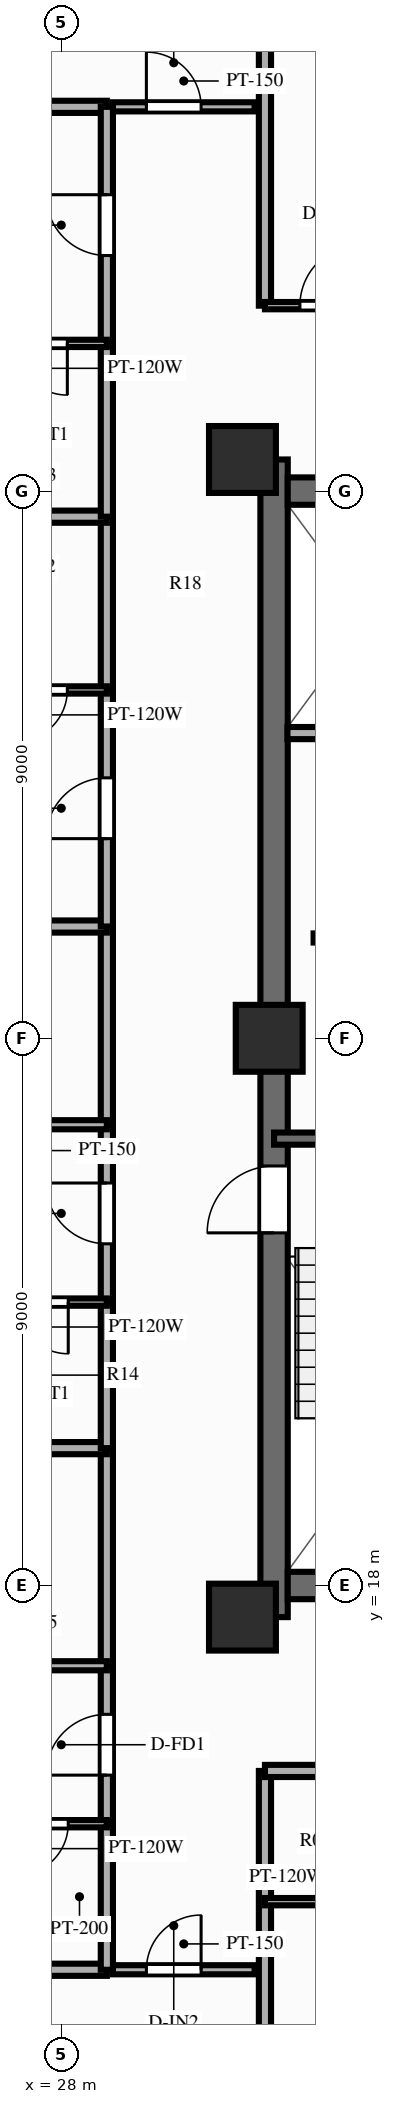
"""IFC4 building model, lengths in metres.
Left out: names, types, materials, properties, quantities, classifications, styles, units other than length and angle.
Written with IfcOpenShell. Run it as: python <this file> out.ifc"""

import sys

from ifc_helpers import new_model, si_unit, direction, frame, frame_2d, origin, origin_2d, place, context, subcontext, project, spatial, rectangle, extrude, source, transform, mapped, element, fill, save


model = new_model("IFC4")
c1 = context("Model", 3, precision=1e-05, world=origin(), true_north=direction((0.0, 1.0)))
c2 = subcontext(c1, "Body", "Model", "MODEL_VIEW")
j1 = project(units=[si_unit("LENGTHUNIT", "METRE"), si_unit("PLANEANGLEUNIT", "RADIAN")], contexts=[c1])
p1 = place(None, origin())
s1 = spatial("IfcSite", under=j1, at=p1, CompositionType="ELEMENT")
p2 = place(p1, origin())
s2 = spatial("IfcBuilding", under=s1, at=p2, CompositionType="ELEMENT")
p3 = place(p2, frame((0.0, 0.0, 202.6)))
s3 = spatial("IfcBuildingStorey", under=s2, at=p3, CompositionType="ELEMENT", Elevation=202.6)
p4 = place(p3, frame((31.5, 17.48, 0.0), z_axis=(0.0, 0.0, 1.0), x_axis=(0.0, 1.0, 0.0)))
e1 = element("IfcWall", 1, at=p4, inside=s3, PredefinedType="SHEAR", context=c2, shape_type="SweptSolid", body=[
    extrude(rectangle(XDim=19.04, YDim=0.45, at=frame_2d((9.52, 0.0))), origin(), (0.0, 0.0, 1.0), 3.9),
])
p5 = place(p4, frame((6.32, 0.0, 0.0)))
e2 = element("IfcOpeningElement", 2, at=p5, cuts=e1, PredefinedType="OPENING", context=c2, shape_type="SweptSolid", body=[
    extrude(rectangle(XDim=1.1, YDim=2.15, at=frame_2d((0.55, 1.075))), frame((0.0, 0.237, 0.0), z_axis=(0.0, -1.0, 0.0), x_axis=(1.0, 0.0, 0.0)), (0.0, 0.0, 1.0), 0.474),
])
p6 = place(p3, frame((31.725, 18.0, 0.0), z_axis=(0.0, 0.0, 1.0), x_axis=(1.0, 0.0, 0.0)))
e3 = element("IfcWall", 3, at=p6, inside=s3, PredefinedType="SHEAR", context=c2, shape_type="SweptSolid", body=[
    extrude(rectangle(XDim=12.55, YDim=0.45, at=frame_2d((6.275, 0.0))), origin(), (0.0, 0.0, 1.0), 3.9),
])
p7 = place(p3, frame((31.725, 36.0, 0.0), z_axis=(0.0, 0.0, 1.0), x_axis=(1.0, 0.0, 0.0)))
e4 = element("IfcWall", 4, at=p7, inside=s3, PredefinedType="SHEAR", context=c2, shape_type="SweptSolid", body=[
    extrude(rectangle(XDim=12.55, YDim=0.45, at=frame_2d((6.275, 0.0))), origin(), (0.0, 0.0, 1.0), 3.9),
])
p8 = place(p7, frame((5.225, 0.0, 0.0), z_axis=(0.0, 0.0, 1.0), x_axis=(-1.0, 0.0, 0.0)))
e5 = element("IfcOpeningElement", 5, at=p8, cuts=e4, PredefinedType="OPENING", context=c2, shape_type="SweptSolid", body=[
    extrude(rectangle(XDim=1.4, YDim=2.15, at=frame_2d((0.7, 1.075))), frame((0.0, 0.237, 0.0), z_axis=(0.0, -1.0, 0.0), x_axis=(1.0, 0.0, 0.0)), (0.0, 0.0, 1.0), 0.474),
])
m1 = source(origin(), c2, "Body", "SweptSolid", [
    extrude(rectangle(XDim=1.1, YDim=1.1, at=origin_2d()), origin(), (0.0, 0.0, 1.0), 3.9),
])
for number, where, z_axis, x_axis in (
    (6, (30.98, 17.48, 0.0), (0.0, 0.0, 1.0), (1.0, 0.0, 0.0)),
    (7, (30.98, 36.52, 0.0), (0.0, 0.0, 1.0), (1.0, 0.0, 0.0)),
    (8, (31.42, 27.0, 0.0), (0.0, 0.0, 1.0), (1.0, 0.0, 0.0)),
):
    element("IfcColumn", number, at=place(p3, frame(where, z_axis=z_axis, x_axis=x_axis)), inside=s3, PredefinedType="COLUMN", context=c2, shape_type="MappedRepresentation", body=[
        mapped(m1, transform((0.0, 0.0, 0.0), scale=1.0)),
    ])
p9 = place(p3, frame((32.15, 28.65, 0.0), z_axis=(0.0, 0.0, 1.0), x_axis=(1.0, 0.0, 0.0)))
e9 = element("IfcWall", 9, at=p9, inside=s3, PredefinedType="PARTITIONING", context=c2, shape_type="SweptSolid", body=[
    extrude(rectangle(XDim=2.27, YDim=0.15, at=frame_2d((1.135, 0.0))), origin(), (0.0, 0.0, 1.0), 3.04),
])
p10 = place(p3, frame((31.5, 25.35, 0.0), z_axis=(0.0, 0.0, 1.0), x_axis=(1.0, 0.0, 0.0)))
e10 = element("IfcWall", 10, at=p10, inside=s3, PredefinedType="SOLIDWALL", context=c2, shape_type="SweptSolid", body=[
    extrude(rectangle(XDim=3.93, YDim=0.2, at=frame_2d((1.965, 0.0))), origin(), (0.0, 0.0, 1.0), 3.6),
])
p11 = place(p3, frame((31.72, 32.02, 0.0), z_axis=(0.0, 0.0, 1.0), x_axis=(1.0, 0.0, 0.0)))
e11 = element("IfcWall", 11, at=p11, inside=s3, PredefinedType="PARTITIONING", context=c2, shape_type="SweptSolid", body=[
    extrude(rectangle(XDim=2.8, YDim=0.2, at=frame_2d((1.4, 0.0))), origin(), (0.0, 0.0, 1.0), 3.6),
])
p12 = place(p3, frame((28.85, 11.68, 0.0), z_axis=(0.0, 0.0, 1.0), x_axis=(1.0, 0.0, 0.0)))
e12 = element("IfcWall", 12, at=p12, inside=s3, PredefinedType="PARTITIONING", context=c2, shape_type="SweptSolid", body=[
    extrude(rectangle(XDim=2.33, YDim=0.15, at=frame_2d((1.165, 0.0))), origin(), (0.0, 0.0, 1.0), 3.6),
])
p13 = place(p12, frame((0.55, 0.0, 0.0)))
e13 = element("IfcOpeningElement", 13, at=p13, cuts=e12, PredefinedType="OPENING", context=c2, shape_type="SweptSolid", body=[
    extrude(rectangle(XDim=0.9, YDim=2.1, at=frame_2d((0.45, 1.05))), frame((0.0, 0.087, 0.0), z_axis=(0.0, -1.0, 0.0), x_axis=(1.0, 0.0, 0.0)), (0.0, 0.0, 1.0), 0.174),
])
p14 = place(p3, frame((28.85, 42.32, 0.0), z_axis=(0.0, 0.0, 1.0), x_axis=(1.0, 0.0, 0.0)))
e14 = element("IfcWall", 14, at=p14, inside=s3, PredefinedType="PARTITIONING", context=c2, shape_type="SweptSolid", body=[
    extrude(rectangle(XDim=2.33, YDim=0.15, at=frame_2d((1.165, 0.0))), origin(), (0.0, 0.0, 1.0), 3.6),
])
p15 = place(p14, frame((0.55, 0.0, 0.0)))
e15 = element("IfcOpeningElement", 15, at=p15, cuts=e14, PredefinedType="OPENING", context=c2, shape_type="SweptSolid", body=[
    extrude(rectangle(XDim=0.9, YDim=2.1, at=frame_2d((0.45, 1.05))), frame((0.0, 0.087, 0.0), z_axis=(0.0, -1.0, 0.0), x_axis=(1.0, 0.0, 0.0)), (0.0, 0.0, 1.0), 0.174),
])
p16 = place(p3, frame((31.35, 14.95, 0.0), z_axis=(0.0, 0.0, 1.0), x_axis=(0.0, -1.0, 0.0)))
e16 = element("IfcWall", 16, at=p16, inside=s3, PredefinedType="PARTITIONING", context=c2, shape_type="SweptSolid", body=[
    extrude(rectangle(XDim=8.8, YDim=0.2, at=frame_2d((4.4, 0.0))), origin(), (0.0, 0.0, 1.0), 2.79),
])
p17 = place(p3, frame((31.35, 14.95, 0.0), z_axis=(0.0, 0.0, 1.0), x_axis=(1.0, 0.0, 0.0)))
e17 = element("IfcWall", 17, at=p17, inside=s3, PredefinedType="PARTITIONING", context=c2, shape_type="SweptSolid", body=[
    extrude(rectangle(XDim=2.85, YDim=0.2, at=frame_2d((1.425, 0.0))), origin(), (0.0, 0.0, 1.0), 3.6),
])
p18 = place(p3, frame((31.35, 12.8, 0.0), z_axis=(0.0, 0.0, 1.0), x_axis=(1.0, 0.0, 0.0)))
e18 = element("IfcWall", 18, at=p18, inside=s3, PredefinedType="PARTITIONING", context=c2, shape_type="SweptSolid", body=[
    extrude(rectangle(XDim=2.85, YDim=0.12, at=frame_2d((1.425, 0.0))), origin(), (0.0, 0.0, 1.0), 3.6),
])
p19 = place(p3, frame((31.35, 39.05, 0.0), z_axis=(0.0, 0.0, 1.0), x_axis=(0.0, 1.0, 0.0)))
e19 = element("IfcWall", 19, at=p19, inside=s3, PredefinedType="PARTITIONING", context=c2, shape_type="SweptSolid", body=[
    extrude(rectangle(XDim=8.8, YDim=0.2, at=frame_2d((4.4, 0.0))), origin(), (0.0, 0.0, 1.0), 2.79),
])
p20 = place(p3, frame((31.35, 39.05, 0.0), z_axis=(0.0, 0.0, 1.0), x_axis=(1.0, 0.0, 0.0)))
e20 = element("IfcWall", 20, at=p20, inside=s3, PredefinedType="PARTITIONING", context=c2, shape_type="SweptSolid", body=[
    extrude(rectangle(XDim=2.15, YDim=0.12, at=frame_2d((1.075, 0.0))), origin(), (0.0, 0.0, 1.0), 3.6),
])
p21 = place(p20, frame((0.575, 0.0, 0.0)))
e21 = element("IfcOpeningElement", 21, at=p21, cuts=e20, PredefinedType="OPENING", context=c2, shape_type="SweptSolid", body=[
    extrude(rectangle(XDim=1.0, YDim=2.1, at=frame_2d((0.5, 1.05))), frame((0.0, 0.072, 0.0), z_axis=(0.0, -1.0, 0.0), x_axis=(1.0, 0.0, 0.0)), (0.0, 0.0, 1.0), 0.144),
])
for number, where, z_axis, x_axis in (
    (22, (28.75, 11.68, 0.0), (0.0, 0.0, 1.0), (-1.0, 0.0, 0.0)),
    (23, (28.75, 42.32, 0.0), (0.0, 0.0, 1.0), (-1.0, 0.0, 0.0)),
):
    element("IfcWall", number, at=place(p3, frame(where, z_axis=z_axis, x_axis=x_axis)), inside=s3, PredefinedType="PARTITIONING", context=c2, shape_type="SweptSolid", body=[
        extrude(rectangle(XDim=9.1, YDim=0.2, at=frame_2d((4.55, 0.0))), origin(), (0.0, 0.0, 1.0), 3.6),
    ])
p22 = place(p3, frame((28.75, 11.68, 0.0), z_axis=(0.0, 0.0, 1.0), x_axis=(0.0, 1.0, 0.0)))
e24 = element("IfcWall", 24, at=p22, inside=s3, PredefinedType="PARTITIONING", context=c2, shape_type="SweptSolid", body=[
    extrude(rectangle(XDim=2.402, YDim=0.2, at=frame_2d((1.201, 0.0))), origin(), (0.0, 0.0, 1.0), 3.6),
])
p23 = place(p3, frame((28.75, 14.082, 0.0), z_axis=(0.0, 0.0, 1.0), x_axis=(0.0, 1.0, 0.0)))
e25 = element("IfcWall", 25, at=p23, inside=s3, PredefinedType="PARTITIONING", context=c2, shape_type="SweptSolid", body=[
    extrude(rectangle(XDim=2.598, YDim=0.2, at=frame_2d((1.299, 0.0))), origin(), (0.0, 0.0, 1.0), 3.6),
])
p24 = place(p23, frame((0.799, 0.0, 0.0)))
e26 = element("IfcOpeningElement", 26, at=p24, cuts=e25, PredefinedType="OPENING", context=c2, shape_type="SweptSolid", body=[
    extrude(rectangle(XDim=1.0, YDim=2.15, at=frame_2d((0.5, 1.075))), frame((0.0, 0.112, 0.0), z_axis=(0.0, -1.0, 0.0), x_axis=(1.0, 0.0, 0.0)), (0.0, 0.0, 1.0), 0.224),
])
p25 = place(p3, frame((28.75, 16.68, 0.0), z_axis=(0.0, 0.0, 1.0), x_axis=(0.0, 1.0, 0.0)))
e27 = element("IfcWall", 27, at=p25, inside=s3, PredefinedType="PARTITIONING", context=c2, shape_type="SweptSolid", body=[
    extrude(rectangle(XDim=3.579, YDim=0.2, at=frame_2d((1.79, 0.0))), origin(), (0.0, 0.0, 1.0), 3.6),
])
p26 = place(p3, frame((28.75, 14.082, 0.0), z_axis=(0.0, 0.0, 1.0), x_axis=(-1.0, 0.0, 0.0)))
e28 = element("IfcWall", 28, at=p26, inside=s3, PredefinedType="PARTITIONING", context=c2, shape_type="SweptSolid", body=[
    extrude(rectangle(XDim=2.12, YDim=0.12, at=frame_2d((1.06, 0.0))), origin(), (0.0, 0.0, 1.0), 3.6),
])
p27 = place(p26, frame((0.635, 0.0, 0.0)))
e29 = element("IfcOpeningElement", 29, at=p27, cuts=e28, PredefinedType="OPENING", context=c2, shape_type="SweptSolid", body=[
    extrude(rectangle(XDim=0.85, YDim=2.05, at=frame_2d((0.425, 1.025))), frame((0.0, 0.072, 0.0), z_axis=(0.0, -1.0, 0.0), x_axis=(1.0, 0.0, 0.0)), (0.0, 0.0, 1.0), 0.144),
])
p28 = place(p3, frame((28.75, 16.68, 0.0), z_axis=(0.0, 0.0, 1.0), x_axis=(-1.0, 0.0, 0.0)))
e30 = element("IfcWall", 30, at=p28, inside=s3, PredefinedType="PARTITIONING", context=c2, shape_type="SweptSolid", body=[
    extrude(rectangle(XDim=3.08, YDim=0.15, at=frame_2d((1.54, 0.0))), origin(), (0.0, 0.0, 1.0), 3.6),
])
p29 = place(p28, frame((1.09, 0.0, 0.0)))
e31 = element("IfcOpeningElement", 31, at=p29, cuts=e30, PredefinedType="OPENING", context=c2, shape_type="SweptSolid", body=[
    extrude(rectangle(XDim=0.9, YDim=2.1, at=frame_2d((0.45, 1.05))), frame((0.0, 0.087, 0.0), z_axis=(0.0, -1.0, 0.0), x_axis=(1.0, 0.0, 0.0)), (0.0, 0.0, 1.0), 0.174),
])
p30 = place(p3, frame((28.75, 20.259, 0.0), z_axis=(0.0, 0.0, 1.0), x_axis=(-1.0, 0.0, 0.0)))
e32 = element("IfcWall", 32, at=p30, inside=s3, PredefinedType="PARTITIONING", context=c2, shape_type="SweptSolid", body=[
    extrude(rectangle(XDim=9.1, YDim=0.2, at=frame_2d((4.55, 0.0))), origin(), (0.0, 0.0, 1.0), 3.6),
])
p31 = place(p3, frame((28.75, 20.259, 0.0), z_axis=(0.0, 0.0, 1.0), x_axis=(0.0, 1.0, 0.0)))
e33 = element("IfcWall", 33, at=p31, inside=s3, PredefinedType="PARTITIONING", context=c2, shape_type="SweptSolid", body=[
    extrude(rectangle(XDim=2.402, YDim=0.2, at=frame_2d((1.201, 0.0))), origin(), (0.0, 0.0, 1.0), 3.6),
])
p32 = place(p3, frame((28.75, 22.661, 0.0), z_axis=(0.0, 0.0, 1.0), x_axis=(0.0, 1.0, 0.0)))
e34 = element("IfcWall", 34, at=p32, inside=s3, PredefinedType="PARTITIONING", context=c2, shape_type="SweptSolid", body=[
    extrude(rectangle(XDim=2.917, YDim=0.2, at=frame_2d((1.458, 0.0))), origin(), (0.0, 0.0, 1.0), 3.6),
])
p33 = place(p32, frame((0.958, 0.0, 0.0)))
e35 = element("IfcOpeningElement", 35, at=p33, cuts=e34, PredefinedType="OPENING", context=c2, shape_type="SweptSolid", body=[
    extrude(rectangle(XDim=1.0, YDim=2.15, at=frame_2d((0.5, 1.075))), frame((0.0, 0.112, 0.0), z_axis=(0.0, -1.0, 0.0), x_axis=(1.0, 0.0, 0.0)), (0.0, 0.0, 1.0), 0.224),
])
p34 = place(p3, frame((28.75, 25.578, 0.0), z_axis=(0.0, 0.0, 1.0), x_axis=(0.0, 1.0, 0.0)))
e36 = element("IfcWall", 36, at=p34, inside=s3, PredefinedType="PARTITIONING", context=c2, shape_type="SweptSolid", body=[
    extrude(rectangle(XDim=3.26, YDim=0.2, at=frame_2d((1.63, 0.0))), origin(), (0.0, 0.0, 1.0), 3.6),
])
p35 = place(p3, frame((28.75, 22.661, 0.0), z_axis=(0.0, 0.0, 1.0), x_axis=(-1.0, 0.0, 0.0)))
e37 = element("IfcWall", 37, at=p35, inside=s3, PredefinedType="PARTITIONING", context=c2, shape_type="SweptSolid", body=[
    extrude(rectangle(XDim=2.12, YDim=0.12, at=frame_2d((1.06, 0.0))), origin(), (0.0, 0.0, 1.0), 3.6),
])
p36 = place(p35, frame((0.635, 0.0, 0.0)))
e38 = element("IfcOpeningElement", 38, at=p36, cuts=e37, PredefinedType="OPENING", context=c2, shape_type="SweptSolid", body=[
    extrude(rectangle(XDim=0.85, YDim=2.05, at=frame_2d((0.425, 1.025))), frame((0.0, 0.072, 0.0), z_axis=(0.0, -1.0, 0.0), x_axis=(1.0, 0.0, 0.0)), (0.0, 0.0, 1.0), 0.144),
])
p37 = place(p3, frame((28.75, 25.578, 0.0), z_axis=(0.0, 0.0, 1.0), x_axis=(-1.0, 0.0, 0.0)))
e39 = element("IfcWall", 39, at=p37, inside=s3, PredefinedType="PARTITIONING", context=c2, shape_type="SweptSolid", body=[
    extrude(rectangle(XDim=3.08, YDim=0.15, at=frame_2d((1.54, 0.0))), origin(), (0.0, 0.0, 1.0), 3.6),
])
p38 = place(p37, frame((1.09, 0.0, 0.0)))
e40 = element("IfcOpeningElement", 40, at=p38, cuts=e39, PredefinedType="OPENING", context=c2, shape_type="SweptSolid", body=[
    extrude(rectangle(XDim=0.9, YDim=2.1, at=frame_2d((0.45, 1.05))), frame((0.0, 0.087, 0.0), z_axis=(0.0, -1.0, 0.0), x_axis=(1.0, 0.0, 0.0)), (0.0, 0.0, 1.0), 0.174),
])
p39 = place(p3, frame((28.75, 28.838, 0.0), z_axis=(0.0, 0.0, 1.0), x_axis=(-1.0, 0.0, 0.0)))
e41 = element("IfcWall", 41, at=p39, inside=s3, PredefinedType="PARTITIONING", context=c2, shape_type="SweptSolid", body=[
    extrude(rectangle(XDim=9.1, YDim=0.2, at=frame_2d((4.55, 0.0))), origin(), (0.0, 0.0, 1.0), 3.6),
])
p40 = place(p3, frame((28.75, 28.838, 0.0), z_axis=(0.0, 0.0, 1.0), x_axis=(0.0, 1.0, 0.0)))
e42 = element("IfcWall", 42, at=p40, inside=s3, PredefinedType="PARTITIONING", context=c2, shape_type="SweptSolid", body=[
    extrude(rectangle(XDim=3.891, YDim=0.2, at=frame_2d((1.945, 0.0))), origin(), (0.0, 0.0, 1.0), 3.6),
])
p41 = place(p40, frame((1.445, 0.0, 0.0)))
e43 = element("IfcOpeningElement", 43, at=p41, cuts=e42, PredefinedType="OPENING", context=c2, shape_type="SweptSolid", body=[
    extrude(rectangle(XDim=1.0, YDim=2.15, at=frame_2d((0.5, 1.075))), frame((0.0, 0.112, 0.0), z_axis=(0.0, -1.0, 0.0), x_axis=(1.0, 0.0, 0.0)), (0.0, 0.0, 1.0), 0.224),
])
p42 = place(p3, frame((28.75, 32.729, 0.0), z_axis=(0.0, 0.0, 1.0), x_axis=(0.0, 1.0, 0.0)))
e44 = element("IfcWall", 44, at=p42, inside=s3, PredefinedType="PARTITIONING", context=c2, shape_type="SweptSolid", body=[
    extrude(rectangle(XDim=2.85, YDim=0.2, at=frame_2d((1.425, 0.0))), origin(), (0.0, 0.0, 1.0), 3.6),
])
p43 = place(p3, frame((28.75, 32.729, 0.0), z_axis=(0.0, 0.0, 1.0), x_axis=(-1.0, 0.0, 0.0)))
e45 = element("IfcWall", 45, at=p43, inside=s3, PredefinedType="PARTITIONING", context=c2, shape_type="SweptSolid", body=[
    extrude(rectangle(XDim=2.15, YDim=0.12, at=frame_2d((1.075, 0.0))), origin(), (0.0, 0.0, 1.0), 3.6),
])
p44 = place(p43, frame((0.65, 0.0, 0.0)))
e46 = element("IfcOpeningElement", 46, at=p44, cuts=e45, PredefinedType="OPENING", context=c2, shape_type="SweptSolid", body=[
    extrude(rectangle(XDim=0.85, YDim=2.05, at=frame_2d((0.425, 1.025))), frame((0.0, 0.072, 0.0), z_axis=(0.0, -1.0, 0.0), x_axis=(1.0, 0.0, 0.0)), (0.0, 0.0, 1.0), 0.144),
])
p45 = place(p3, frame((28.75, 35.579, 0.0), z_axis=(0.0, 0.0, 1.0), x_axis=(-1.0, 0.0, 0.0)))
e47 = element("IfcWall", 47, at=p45, inside=s3, PredefinedType="PARTITIONING", context=c2, shape_type="SweptSolid", body=[
    extrude(rectangle(XDim=9.1, YDim=0.2, at=frame_2d((4.55, 0.0))), origin(), (0.0, 0.0, 1.0), 3.6),
])
p46 = place(p3, frame((28.75, 35.579, 0.0), z_axis=(0.0, 0.0, 1.0), x_axis=(0.0, 1.0, 0.0)))
e48 = element("IfcWall", 48, at=p46, inside=s3, PredefinedType="PARTITIONING", context=c2, shape_type="SweptSolid", body=[
    extrude(rectangle(XDim=2.85, YDim=0.2, at=frame_2d((1.425, 0.0))), origin(), (0.0, 0.0, 1.0), 3.6),
])
p47 = place(p3, frame((28.75, 38.429, 0.0), z_axis=(0.0, 0.0, 1.0), x_axis=(0.0, 1.0, 0.0)))
e49 = element("IfcWall", 49, at=p47, inside=s3, PredefinedType="PARTITIONING", context=c2, shape_type="SweptSolid", body=[
    extrude(rectangle(XDim=3.891, YDim=0.2, at=frame_2d((1.945, 0.0))), origin(), (0.0, 0.0, 1.0), 3.6),
])
p48 = place(p47, frame((1.445, 0.0, 0.0)))
e50 = element("IfcOpeningElement", 50, at=p48, cuts=e49, PredefinedType="OPENING", context=c2, shape_type="SweptSolid", body=[
    extrude(rectangle(XDim=1.0, YDim=2.15, at=frame_2d((0.5, 1.075))), frame((0.0, 0.112, 0.0), z_axis=(0.0, -1.0, 0.0), x_axis=(1.0, 0.0, 0.0)), (0.0, 0.0, 1.0), 0.224),
])
p49 = place(p3, frame((28.75, 38.429, 0.0), z_axis=(0.0, 0.0, 1.0), x_axis=(-1.0, 0.0, 0.0)))
e51 = element("IfcWall", 51, at=p49, inside=s3, PredefinedType="PARTITIONING", context=c2, shape_type="SweptSolid", body=[
    extrude(rectangle(XDim=2.15, YDim=0.12, at=frame_2d((1.075, 0.0))), origin(), (0.0, 0.0, 1.0), 3.6),
])
p50 = place(p49, frame((0.65, 0.0, 0.0)))
e52 = element("IfcOpeningElement", 52, at=p50, cuts=e51, PredefinedType="OPENING", context=c2, shape_type="SweptSolid", body=[
    extrude(rectangle(XDim=0.85, YDim=2.05, at=frame_2d((0.425, 1.025))), frame((0.0, 0.072, 0.0), z_axis=(0.0, -1.0, 0.0), x_axis=(1.0, 0.0, 0.0)), (0.0, 0.0, 1.0), 0.144),
])
m2 = source(origin(), c2, "Body", "SweptSolid", [
    extrude(rectangle(XDim=1.1, YDim=2.15, at=frame_2d((0.55, 1.075))), frame((0.0, 0.025, 0.0), z_axis=(0.0, -1.0, 0.0), x_axis=(1.0, 0.0, 0.0)), (0.0, 0.0, 1.0), 0.05),
])
p51 = place(p5, origin())
e53 = element("IfcDoor", 53, at=p51, inside=s3, OperationType="SINGLE_SWING_LEFT", PredefinedType="DOOR", context=c2, shape_type="MappedRepresentation", body=[
    mapped(m2, transform((0.0, 0.0, 0.0), scale=1.0)),
])
fill(e2, e53)
m3 = source(origin(), c2, "Body", "SweptSolid", [
    extrude(rectangle(XDim=0.9, YDim=2.1, at=frame_2d((0.45, 1.05))), frame((0.0, 0.025, 0.0), z_axis=(0.0, -1.0, 0.0), x_axis=(1.0, 0.0, 0.0)), (0.0, 0.0, 1.0), 0.05),
])
p52 = place(p13, origin())
e54 = element("IfcDoor", 54, at=p52, inside=s3, OperationType="SINGLE_SWING_RIGHT", PredefinedType="DOOR", context=c2, shape_type="MappedRepresentation", body=[
    mapped(m3, transform((0.0, 0.0, 0.0), scale=1.0)),
])
fill(e13, e54)
p53 = place(p15, origin())
e55 = element("IfcDoor", 55, at=p53, inside=s3, OperationType="SINGLE_SWING_LEFT", PredefinedType="DOOR", context=c2, shape_type="MappedRepresentation", body=[
    mapped(m3, transform((0.0, 0.0, 0.0), scale=1.0)),
])
fill(e15, e55)
m4 = source(origin(), c2, "Body", "SweptSolid", [
    extrude(rectangle(XDim=1.0, YDim=2.1, at=frame_2d((0.5, 1.05))), frame((0.0, 0.025, 0.0), z_axis=(0.0, -1.0, 0.0), x_axis=(1.0, 0.0, 0.0)), (0.0, 0.0, 1.0), 0.05),
])
p54 = place(p21, origin())
e56 = element("IfcDoor", 56, at=p54, inside=s3, OperationType="SINGLE_SWING_RIGHT", PredefinedType="DOOR", context=c2, shape_type="MappedRepresentation", body=[
    mapped(m4, transform((0.0, 0.0, 0.0), scale=1.0)),
])
fill(e21, e56)
m5 = source(origin(), c2, "Body", "SweptSolid", [
    extrude(rectangle(XDim=1.0, YDim=2.15, at=frame_2d((0.5, 1.075))), frame((0.0, 0.025, 0.0), z_axis=(0.0, -1.0, 0.0), x_axis=(1.0, 0.0, 0.0)), (0.0, 0.0, 1.0), 0.05),
])
p55 = place(p24, origin())
e57 = element("IfcDoor", 57, at=p55, inside=s3, OperationType="SINGLE_SWING_LEFT", PredefinedType="DOOR", context=c2, shape_type="MappedRepresentation", body=[
    mapped(m5, transform((0.0, 0.0, 0.0), scale=1.0)),
])
fill(e26, e57)
m6 = source(origin(), c2, "Body", "SweptSolid", [
    extrude(rectangle(XDim=0.85, YDim=2.05, at=frame_2d((0.425, 1.025))), frame((0.0, 0.025, 0.0), z_axis=(0.0, -1.0, 0.0), x_axis=(1.0, 0.0, 0.0)), (0.0, 0.0, 1.0), 0.05),
])
p56 = place(p27, origin())
e58 = element("IfcDoor", 58, at=p56, inside=s3, OperationType="SINGLE_SWING_RIGHT", PredefinedType="DOOR", context=c2, shape_type="MappedRepresentation", body=[
    mapped(m6, transform((0.0, 0.0, 0.0), scale=1.0)),
])
fill(e29, e58)
p57 = place(p33, origin())
e59 = element("IfcDoor", 59, at=p57, inside=s3, OperationType="SINGLE_SWING_RIGHT", PredefinedType="DOOR", context=c2, shape_type="MappedRepresentation", body=[
    mapped(m5, transform((0.0, 0.0, 0.0), scale=1.0)),
])
fill(e35, e59)
p58 = place(p36, origin())
e60 = element("IfcDoor", 60, at=p58, inside=s3, OperationType="SINGLE_SWING_LEFT", PredefinedType="DOOR", context=c2, shape_type="MappedRepresentation", body=[
    mapped(m6, transform((0.0, 0.0, 0.0), scale=1.0)),
])
fill(e38, e60)
p59 = place(p41, origin())
e61 = element("IfcDoor", 61, at=p59, inside=s3, OperationType="SINGLE_SWING_LEFT", PredefinedType="DOOR", context=c2, shape_type="MappedRepresentation", body=[
    mapped(m5, transform((0.0, 0.0, 0.0), scale=1.0)),
])
fill(e43, e61)
p60 = place(p44, origin())
e62 = element("IfcDoor", 62, at=p60, inside=s3, OperationType="SINGLE_SWING_RIGHT", PredefinedType="DOOR", context=c2, shape_type="MappedRepresentation", body=[
    mapped(m6, transform((0.0, 0.0, 0.0), scale=1.0)),
])
fill(e46, e62)
p61 = place(p48, origin())
e63 = element("IfcDoor", 63, at=p61, inside=s3, OperationType="SINGLE_SWING_RIGHT", PredefinedType="DOOR", context=c2, shape_type="MappedRepresentation", body=[
    mapped(m5, transform((0.0, 0.0, 0.0), scale=1.0)),
])
fill(e50, e63)
p62 = place(p50, origin())
e64 = element("IfcDoor", 64, at=p62, inside=s3, OperationType="SINGLE_SWING_LEFT", PredefinedType="DOOR", context=c2, shape_type="MappedRepresentation", body=[
    mapped(m6, transform((0.0, 0.0, 0.0), scale=1.0)),
])
fill(e52, e64)
save(model, sys.argv[1])
